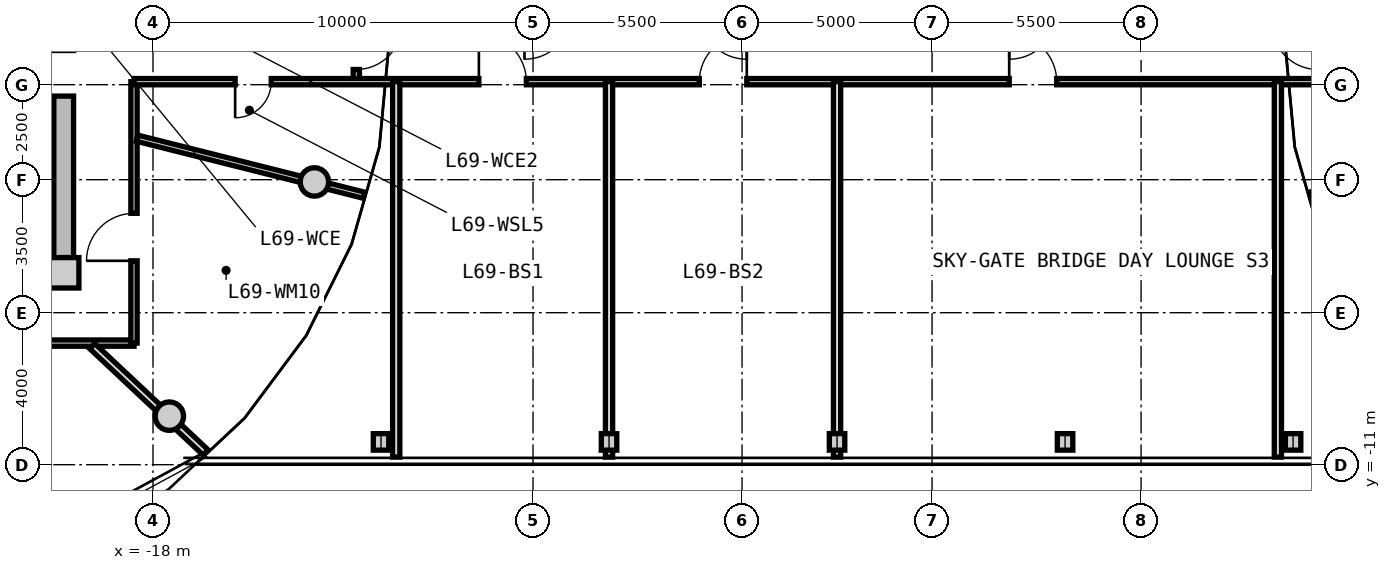
"""IFC4 building model, lengths in metres.
Left out: names, types, materials, properties, quantities, classifications, styles, units other than length and angle.
Written with IfcOpenShell. Run it as: python <this file> out.ifc"""

import sys

from ifc_helpers import new_model, si_unit, direction, frame, frame_2d, origin, origin_2d, place, context, subcontext, project, spatial, rectangle, circle, i_section, extrude, source, transform, mapped, element, fill, save


model = new_model("IFC4")
c1 = context("Model", 3, precision=1e-05, world=origin(), true_north=direction((0.0, 1.0)))
c2 = subcontext(c1, "Body", "Model", "MODEL_VIEW")
j1 = project(units=[si_unit("LENGTHUNIT", "METRE"), si_unit("PLANEANGLEUNIT", "RADIAN")], contexts=[c1])
p1 = place(None, origin())
s1 = spatial("IfcSite", under=j1, at=p1, CompositionType="ELEMENT")
p2 = place(p1, origin())
s2 = spatial("IfcBuilding", under=s1, at=p2, CompositionType="ELEMENT")
p3 = place(p2, frame((0.0, 0.0, 223.05)))
s3 = spatial("IfcBuildingStorey", under=s2, at=p3, CompositionType="ELEMENT", Elevation=223.05)
m1 = source(origin(), c2, "Body", "SweptSolid", [
    extrude(rectangle(XDim=0.8, YDim=0.8, at=origin_2d()), origin(), (0.0, 0.0, 1.0), 3.05),
])
p4 = place(p3, frame((-20.35, -5.95, 0.0), z_axis=(0.0, 0.0, 1.0), x_axis=(1.0, 0.0, 0.0)))
e1 = element("IfcColumn", 1, at=p4, inside=s3, PredefinedType="COLUMN", context=c2, shape_type="MappedRepresentation", body=[
    mapped(m1, transform((0.0, 0.0, 0.0), x_axis=(1.0, 0.0, 0.0), y_axis=(0.0, 1.0, 0.0), z_axis=(0.0, 0.0, 1.0), scale=1.0)),
])
m2 = source(origin(), c2, "Body", "SweptSolid", [
    extrude(rectangle(XDim=11.1, YDim=0.52, at=frame_2d((5.55, 0.0))), origin(), (0.0, 0.0, 1.0), 2.76),
])
p5 = place(p3, frame((-20.35, 5.55, 0.0), z_axis=(0.0, 0.0, 1.0), x_axis=(0.0, -1.0, 0.0)))
e2 = element("IfcWall", 2, at=p5, inside=s3, PredefinedType="SHEAR", context=c2, shape_type="MappedRepresentation", body=[
    mapped(m2, transform((0.0, 0.0, 0.0), x_axis=(1.0, 0.0, 0.0), y_axis=(0.0, 1.0, 0.0), z_axis=(0.0, 0.0, 1.0), scale=1.0)),
])
p6 = place(p5, frame((5.65, 0.0, 0.0)))
e3 = element("IfcOpeningElement", 3, at=p6, cuts=e2, PredefinedType="OPENING", context=c2, shape_type="SweptSolid", body=[
    extrude(rectangle(XDim=1.2, YDim=2.15, at=frame_2d((0.6, 1.075))), frame((0.0, 0.27, 0.0), z_axis=(0.0, -1.0, 0.0), x_axis=(1.0, 0.0, 0.0)), (0.0, 0.0, 1.0), 0.54),
])
m3 = source(origin(), c2, "Body", "SweptSolid", [
    extrude(circle(Radius=0.375, at=origin_2d()), origin(), (0.0, 0.0, 1.0), 3.05),
])
for number, where, z_axis, x_axis in (
    (4, (-17.57, -9.723, 0.0), (0.0, 0.0, 1.0), (1.0, 0.0, 0.0)),
    (5, (-13.753, -3.559, 0.0), (0.0, 0.0, 1.0), (1.0, 0.0, 0.0)),
):
    element("IfcColumn", number, at=place(p3, frame(where, z_axis=z_axis, x_axis=x_axis)), inside=s3, PredefinedType="COLUMN", context=c2, shape_type="MappedRepresentation", body=[
        mapped(m3, transform((0.0, 0.0, 0.0), x_axis=(1.0, 0.0, 0.0), y_axis=(0.0, 1.0, 0.0), z_axis=(0.0, 0.0, 1.0), scale=1.0)),
    ])
m4 = source(origin(), c2, "Body", "SweptSolid", [
    extrude(i_section(OverallWidth=0.407, OverallDepth=0.435, WebThickness=0.024, FlangeThickness=0.039, FilletRadius=0.015, at=origin_2d()), origin(), (0.0, 0.0, 1.0), 3.05),
])
for number, where, z_axis, x_axis in (
    (6, (-12.0, -10.4, 0.0), (0.0, 0.0, 1.0), (1.0, 0.0, 0.0)),
    (7, (-6.0, -10.4, 0.0), (0.0, 0.0, 1.0), (1.0, 0.0, 0.0)),
    (8, (0.0, -10.4, 0.0), (0.0, 0.0, 1.0), (1.0, 0.0, 0.0)),
    (9, (6.0, -10.4, 0.0), (0.0, 0.0, 1.0), (1.0, 0.0, 0.0)),
    (10, (12.0, -10.4, 0.0), (0.0, 0.0, 1.0), (1.0, 0.0, 0.0)),
):
    element("IfcColumn", number, at=place(p3, frame(where, z_axis=z_axis, x_axis=x_axis)), inside=s3, PredefinedType="COLUMN", context=c2, shape_type="MappedRepresentation", body=[
        mapped(m4, transform((0.0, 0.0, 0.0), x_axis=(1.0, 0.0, 0.0), y_axis=(0.0, 1.0, 0.0), z_axis=(0.0, 0.0, 1.0), scale=1.0)),
    ])
m5 = source(origin(), c2, "Body", "SweptSolid", [
    extrude(rectangle(XDim=19.0, YDim=0.165, at=frame_2d((9.5, 0.0))), origin(), (0.0, 0.0, 1.0), 2.745),
])
p7 = place(p3, frame((-18.5, -7.8, 0.0), z_axis=(0.0, 0.0, 1.0), x_axis=(-1.0, 0.0, 0.0)))
e11 = element("IfcWall", 11, at=p7, inside=s3, PredefinedType="PARTITIONING", context=c2, shape_type="MappedRepresentation", body=[
    mapped(m5, transform((0.0, 0.0, 0.0), x_axis=(1.0, 0.0, 0.0), y_axis=(0.0, 1.0, 0.0), z_axis=(0.0, 0.0, 1.0), scale=1.0)),
])
p8 = place(p7, frame((14.191, 0.0, 0.0)))
e12 = element("IfcOpeningElement", 12, at=p8, cuts=e11, PredefinedType="OPENING", context=c2, shape_type="SweptSolid", body=[
    extrude(rectangle(XDim=1.25, YDim=2.2, at=frame_2d((0.625, 1.1))), frame((0.0, 0.093, 0.0), z_axis=(0.0, -1.0, 0.0), x_axis=(1.0, 0.0, 0.0)), (0.0, 0.0, 1.0), 0.185),
])
p9 = place(p7, frame((8.875, 0.0, 0.0)))
e13 = element("IfcOpeningElement", 13, at=p9, cuts=e11, PredefinedType="OPENING", context=c2, shape_type="SweptSolid", body=[
    extrude(rectangle(XDim=1.25, YDim=2.2, at=frame_2d((0.625, 1.1))), frame((0.0, 0.093, 0.0), z_axis=(0.0, -1.0, 0.0), x_axis=(1.0, 0.0, 0.0)), (0.0, 0.0, 1.0), 0.185),
])
p10 = place(p7, frame((3.559, 0.0, 0.0)))
e14 = element("IfcOpeningElement", 14, at=p10, cuts=e11, PredefinedType="OPENING", context=c2, shape_type="SweptSolid", body=[
    extrude(rectangle(XDim=1.25, YDim=2.2, at=frame_2d((0.625, 1.1))), frame((0.0, 0.093, 0.0), z_axis=(0.0, -1.0, 0.0), x_axis=(1.0, 0.0, 0.0)), (0.0, 0.0, 1.0), 0.185),
])
m6 = source(origin(), c2, "Body", "SweptSolid", [
    extrude(rectangle(XDim=6.88, YDim=0.165, at=frame_2d((3.44, 0.0))), origin(), (0.0, 0.0, 1.0), 2.745),
])
p11 = place(p3, frame((-18.5, -0.92, 0.0), z_axis=(0.0, 0.0, 1.0), x_axis=(0.0, -1.0, 0.0)))
e15 = element("IfcWall", 15, at=p11, inside=s3, PredefinedType="PARTITIONING", context=c2, shape_type="MappedRepresentation", body=[
    mapped(m6, transform((0.0, 0.0, 0.0), x_axis=(1.0, 0.0, 0.0), y_axis=(0.0, 1.0, 0.0), z_axis=(0.0, 0.0, 1.0), scale=1.0)),
])
p12 = place(p11, frame((3.464, 0.0, 0.0)))
e16 = element("IfcOpeningElement", 16, at=p12, cuts=e15, PredefinedType="OPENING", context=c2, shape_type="SweptSolid", body=[
    extrude(rectangle(XDim=1.25, YDim=2.2, at=frame_2d((0.625, 1.1))), frame((0.0, 0.093, 0.0), z_axis=(0.0, -1.0, 0.0), x_axis=(1.0, 0.0, 0.0)), (0.0, 0.0, 1.0), 0.185),
])
m7 = source(origin(), c2, "Body", "SweptSolid", [
    extrude(rectangle(XDim=6.157, YDim=0.165, at=frame_2d((3.079, 0.0))), origin(), (0.0, 0.0, 1.0), 2.345),
])
p13 = place(p3, frame((-18.42, -2.407, 0.0), z_axis=(0.0, 0.0, 1.0), x_axis=(0.969840867184, -0.243738984038, 0.0)))
e17 = element("IfcWall", 17, at=p13, inside=s3, PredefinedType="PARTITIONING", context=c2, shape_type="MappedRepresentation", body=[
    mapped(m7, transform((0.0, 0.0, 0.0), x_axis=(1.0, 0.0, 0.0), y_axis=(0.0, 1.0, 0.0), z_axis=(0.0, 0.0, 1.0), scale=1.0)),
])
m8 = source(origin(), c2, "Body", "SweptSolid", [
    extrude(rectangle(XDim=4.089, YDim=0.19, at=frame_2d((2.044, 0.0))), origin(), (0.0, 0.0, 1.0), 2.345),
])
p14 = place(p3, frame((-19.598, -7.88, 0.0), z_axis=(0.0, 0.0, 1.0), x_axis=(0.729401273609, -0.684086092577, 0.0)))
e18 = element("IfcWall", 18, at=p14, inside=s3, PredefinedType="PARTITIONING", context=c2, shape_type="MappedRepresentation", body=[
    mapped(m8, transform((0.0, 0.0, 0.0), x_axis=(1.0, 0.0, 0.0), y_axis=(0.0, 1.0, 0.0), z_axis=(0.0, 0.0, 1.0), scale=1.0)),
])
p15 = place(p3, frame((18.42, -2.407, 0.0), z_axis=(0.0, 0.0, 1.0), x_axis=(-0.969840867184, -0.243738984038, 0.0)))
e19 = element("IfcWall", 19, at=p15, inside=s3, PredefinedType="PARTITIONING", context=c2, shape_type="MappedRepresentation", body=[
    mapped(m7, transform((0.0, 0.0, 0.0), x_axis=(1.0, 0.0, 0.0), y_axis=(0.0, 1.0, 0.0), z_axis=(0.0, 0.0, 1.0), scale=1.0)),
])
m9 = source(origin(), c2, "Body", "SweptSolid", [
    extrude(rectangle(XDim=1.84, YDim=0.165, at=frame_2d((0.92, 0.0))), origin(), (0.0, 0.0, 1.0), 2.745),
])
p16 = place(p3, frame((-12.65, -0.92, 0.0), z_axis=(0.0, 0.0, 1.0), x_axis=(0.0, 1.0, 0.0)))
e20 = element("IfcWall", 20, at=p16, inside=s3, PredefinedType="PARTITIONING", context=c2, shape_type="MappedRepresentation", body=[
    mapped(m9, transform((0.0, 0.0, 0.0), x_axis=(1.0, 0.0, 0.0), y_axis=(0.0, 1.0, 0.0), z_axis=(0.0, 0.0, 1.0), scale=1.0)),
])
p17 = place(p16, frame((0.32, 0.0, 0.0)))
e21 = element("IfcOpeningElement", 21, at=p17, cuts=e20, PredefinedType="OPENING", context=c2, shape_type="SweptSolid", body=[
    extrude(rectangle(XDim=1.2, YDim=2.15, at=frame_2d((0.6, 1.075))), frame((0.0, 0.093, 0.0), z_axis=(0.0, -1.0, 0.0), x_axis=(1.0, 0.0, 0.0)), (0.0, 0.0, 1.0), 0.185),
])
m10 = source(origin(), c2, "Body", "SweptSolid", [
    extrude(rectangle(XDim=37.0, YDim=0.165, at=frame_2d((18.5, 0.0))), origin(), (0.0, 0.0, 1.0), 2.745),
])
p18 = place(p3, frame((-18.5, -0.92, 0.0), z_axis=(0.0, 0.0, 1.0), x_axis=(1.0, 0.0, 0.0)))
e22 = element("IfcWall", 22, at=p18, inside=s3, PredefinedType="PARTITIONING", context=c2, shape_type="MappedRepresentation", body=[
    mapped(m10, transform((0.0, 0.0, 0.0), x_axis=(1.0, 0.0, 0.0), y_axis=(0.0, 1.0, 0.0), z_axis=(0.0, 0.0, 1.0), scale=1.0)),
])
p19 = place(p18, frame((2.662, 0.0, 0.0)))
e23 = element("IfcOpeningElement", 23, at=p19, cuts=e22, PredefinedType="OPENING", context=c2, shape_type="SweptSolid", body=[
    extrude(rectangle(XDim=0.95, YDim=2.1, at=frame_2d((0.475, 1.05))), frame((0.0, 0.093, 0.0), z_axis=(0.0, -1.0, 0.0), x_axis=(1.0, 0.0, 0.0)), (0.0, 0.0, 1.0), 0.185),
])
p20 = place(p18, frame((33.388, 0.0, 0.0)))
e24 = element("IfcOpeningElement", 24, at=p20, cuts=e22, PredefinedType="OPENING", context=c2, shape_type="SweptSolid", body=[
    extrude(rectangle(XDim=0.95, YDim=2.1, at=frame_2d((0.475, 1.05))), frame((0.0, 0.093, 0.0), z_axis=(0.0, -1.0, 0.0), x_axis=(1.0, 0.0, 0.0)), (0.0, 0.0, 1.0), 0.185),
])
p21 = place(p18, frame((9.075, 0.0, 0.0)))
e25 = element("IfcOpeningElement", 25, at=p21, cuts=e22, PredefinedType="OPENING", context=c2, shape_type="SweptSolid", body=[
    extrude(rectangle(XDim=1.25, YDim=2.2, at=frame_2d((0.625, 1.1))), frame((0.0, 0.093, 0.0), z_axis=(0.0, -1.0, 0.0), x_axis=(1.0, 0.0, 0.0)), (0.0, 0.0, 1.0), 0.185),
])
p22 = place(p18, frame((14.875, 0.0, 0.0)))
e26 = element("IfcOpeningElement", 26, at=p22, cuts=e22, PredefinedType="OPENING", context=c2, shape_type="SweptSolid", body=[
    extrude(rectangle(XDim=1.25, YDim=2.2, at=frame_2d((0.625, 1.1))), frame((0.0, 0.093, 0.0), z_axis=(0.0, -1.0, 0.0), x_axis=(1.0, 0.0, 0.0)), (0.0, 0.0, 1.0), 0.185),
])
p23 = place(p18, frame((23.03, 0.0, 0.0)))
e27 = element("IfcOpeningElement", 27, at=p23, cuts=e22, PredefinedType="OPENING", context=c2, shape_type="SweptSolid", body=[
    extrude(rectangle(XDim=1.25, YDim=2.2, at=frame_2d((0.625, 1.1))), frame((0.0, 0.093, 0.0), z_axis=(0.0, -1.0, 0.0), x_axis=(1.0, 0.0, 0.0)), (0.0, 0.0, 1.0), 0.185),
])
m11 = source(origin(), c2, "Body", "SweptSolid", [
    extrude(rectangle(XDim=9.88, YDim=0.19, at=frame_2d((4.94, 0.0))), origin(), (0.0, 0.0, 1.0), 2.745),
])
for number, where, z_axis, x_axis in (
    (28, (-11.6, -10.8, 0.0), (0.0, 0.0, 1.0), (0.0, 1.0, 0.0)),
    (29, (11.6, -10.8, 0.0), (0.0, 0.0, 1.0), (0.0, 1.0, 0.0)),
):
    element("IfcWall", number, at=place(p3, frame(where, z_axis=z_axis, x_axis=x_axis)), inside=s3, PredefinedType="PARTITIONING", context=c2, shape_type="MappedRepresentation", body=[
        mapped(m11, transform((0.0, 0.0, 0.0), x_axis=(1.0, 0.0, 0.0), y_axis=(0.0, 1.0, 0.0), z_axis=(0.0, 0.0, 1.0), scale=1.0)),
    ])
m12 = source(origin(), c2, "Body", "SweptSolid", [
    extrude(rectangle(XDim=9.88, YDim=0.19, at=frame_2d((4.94, 0.0))), origin(), (0.0, 0.0, 1.0), 2.045),
])
for number, where, z_axis, x_axis in (
    (30, (-6.0, -10.8, 0.0), (0.0, 0.0, 1.0), (0.0, 1.0, 0.0)),
    (31, (0.0, -10.8, 0.0), (0.0, 0.0, 1.0), (0.0, 1.0, 0.0)),
):
    element("IfcWall", number, at=place(p3, frame(where, z_axis=z_axis, x_axis=x_axis)), inside=s3, PredefinedType="PARTITIONING", context=c2, shape_type="MappedRepresentation", body=[
        mapped(m12, transform((0.0, 0.0, 0.0), x_axis=(1.0, 0.0, 0.0), y_axis=(0.0, 1.0, 0.0), z_axis=(0.0, 0.0, 1.0), scale=1.0)),
    ])
m13 = source(origin(), c2, "Body", "SweptSolid", [
    extrude(rectangle(XDim=1.2, YDim=2.15, at=frame_2d((0.6, 1.075))), frame((0.0, 0.025, 0.0), z_axis=(0.0, -1.0, 0.0), x_axis=(1.0, 0.0, 0.0)), (0.0, 0.0, 1.0), 0.05),
])
p24 = place(p6, frame((1.2, 0.0, 0.0), z_axis=(0.0, 0.0, 1.0), x_axis=(-1.0, 0.0, 0.0)))
e32 = element("IfcDoor", 32, at=p24, inside=s3, OperationType="SINGLE_SWING_RIGHT", PredefinedType="DOOR", context=c2, shape_type="MappedRepresentation", body=[
    mapped(m13, transform((0.0, 0.0, 0.0), x_axis=(1.0, 0.0, 0.0), y_axis=(0.0, 1.0, 0.0), z_axis=(0.0, 0.0, 1.0), scale=1.0)),
])
fill(e3, e32)
m14 = source(origin(), c2, "Body", "SweptSolid", [
    extrude(rectangle(XDim=0.95, YDim=2.1, at=frame_2d((0.475, 1.05))), frame((0.0, 0.025, 0.0), z_axis=(0.0, -1.0, 0.0), x_axis=(1.0, 0.0, 0.0)), (0.0, 0.0, 1.0), 0.05),
])
p25 = place(p19, frame((0.95, 0.0, 0.0), z_axis=(0.0, 0.0, 1.0), x_axis=(-1.0, 0.0, 0.0)))
e33 = element("IfcDoor", 33, at=p25, inside=s3, OperationType="SINGLE_SWING_RIGHT", PredefinedType="DOOR", context=c2, shape_type="MappedRepresentation", body=[
    mapped(m14, transform((0.0, 0.0, 0.0), x_axis=(1.0, 0.0, 0.0), y_axis=(0.0, 1.0, 0.0), z_axis=(0.0, 0.0, 1.0), scale=1.0)),
])
fill(e23, e33)
m15 = source(origin(), c2, "Body", "SweptSolid", [
    extrude(rectangle(XDim=1.25, YDim=2.2, at=frame_2d((0.625, 1.1))), frame((0.0, 0.025, 0.0), z_axis=(0.0, -1.0, 0.0), x_axis=(1.0, 0.0, 0.0)), (0.0, 0.0, 1.0), 0.05),
])
p26 = place(p12, frame((1.25, 0.0, 0.0), z_axis=(0.0, 0.0, 1.0), x_axis=(-1.0, 0.0, 0.0)))
e34 = element("IfcDoor", 34, at=p26, inside=s3, OperationType="SINGLE_SWING_LEFT", PredefinedType="DOOR", context=c2, shape_type="MappedRepresentation", body=[
    mapped(m15, transform((0.0, 0.0, 0.0), x_axis=(1.0, 0.0, 0.0), y_axis=(0.0, 1.0, 0.0), z_axis=(0.0, 0.0, 1.0), scale=1.0)),
])
fill(e16, e34)
p27 = place(p17, frame((1.2, 0.0, 0.0), z_axis=(0.0, 0.0, 1.0), x_axis=(-1.0, 0.0, 0.0)))
e35 = element("IfcDoor", 35, at=p27, inside=s3, OperationType="SINGLE_SWING_LEFT", PredefinedType="DOOR", context=c2, shape_type="MappedRepresentation", body=[
    mapped(m13, transform((0.0, 0.0, 0.0), x_axis=(1.0, 0.0, 0.0), y_axis=(0.0, 1.0, 0.0), z_axis=(0.0, 0.0, 1.0), scale=1.0)),
])
fill(e21, e35)
p28 = place(p21, origin())
e36 = element("IfcDoor", 36, at=p28, inside=s3, OperationType="SINGLE_SWING_LEFT", PredefinedType="DOOR", context=c2, shape_type="MappedRepresentation", body=[
    mapped(m15, transform((0.0, 0.0, 0.0), x_axis=(1.0, 0.0, 0.0), y_axis=(0.0, 1.0, 0.0), z_axis=(0.0, 0.0, 1.0), scale=1.0)),
])
fill(e25, e36)
p29 = place(p22, origin())
e37 = element("IfcDoor", 37, at=p29, inside=s3, OperationType="SINGLE_SWING_RIGHT", PredefinedType="DOOR", context=c2, shape_type="MappedRepresentation", body=[
    mapped(m15, transform((0.0, 0.0, 0.0), x_axis=(1.0, 0.0, 0.0), y_axis=(0.0, 1.0, 0.0), z_axis=(0.0, 0.0, 1.0), scale=1.0)),
])
fill(e26, e37)
p30 = place(p23, origin())
e38 = element("IfcDoor", 38, at=p30, inside=s3, OperationType="SINGLE_SWING_LEFT", PredefinedType="DOOR", context=c2, shape_type="MappedRepresentation", body=[
    mapped(m15, transform((0.0, 0.0, 0.0), x_axis=(1.0, 0.0, 0.0), y_axis=(0.0, 1.0, 0.0), z_axis=(0.0, 0.0, 1.0), scale=1.0)),
])
fill(e27, e38)
save(model, sys.argv[1])
